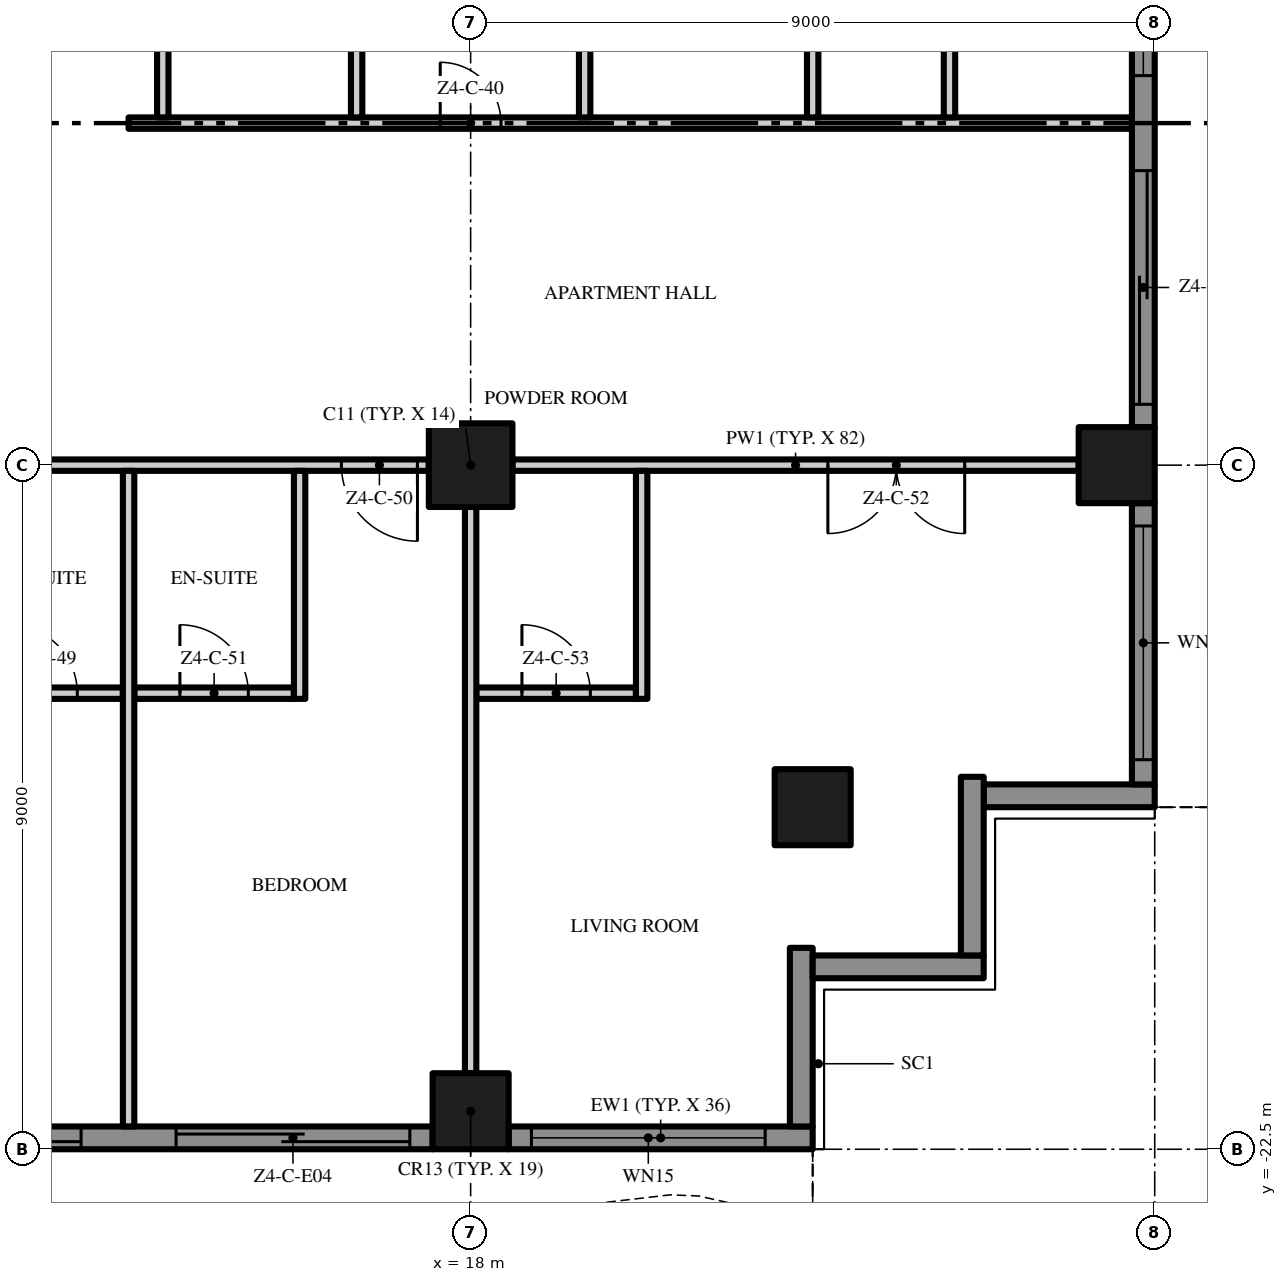
"""IFC4 building model, lengths in metres.
Left out: names, types, materials, properties, quantities, classifications, styles, units other than length and angle.
Written with IfcOpenShell. Run it as: python <this file> out.ifc"""

import sys

from ifc_helpers import new_model, si_unit, direction, frame, frame_2d, origin, origin_2d, place, context, subcontext, project, spatial, polyline, rectangle, outline, extrude, element, fill, save


model = new_model("IFC4")
c1 = context("Model", 3, precision=1e-05, world=origin(), true_north=direction((0.0, 1.0)))
c2 = subcontext(c1, "Body", "Model", "MODEL_VIEW")
j1 = project(units=[si_unit("LENGTHUNIT", "METRE"), si_unit("PLANEANGLEUNIT", "RADIAN")], contexts=[c1])
p1 = place(None, origin())
s1 = spatial("IfcSite", under=j1, at=p1, CompositionType="ELEMENT")
p2 = place(p1, origin())
s2 = spatial("IfcBuilding", under=s1, at=p2, CompositionType="ELEMENT")
p3 = place(p2, frame((0.0, 0.0, 207.2)))
s3 = spatial("IfcBuildingStorey", under=s2, at=p3, CompositionType="ELEMENT", Elevation=207.2)
p4 = place(p3, frame((18.0, -13.5, 0.0), z_axis=(0.0, 0.0, 1.0), x_axis=(1.0, 0.0, 0.0)))
e1 = element("IfcColumn", 1, at=p4, inside=s3, PredefinedType="COLUMN", context=c2, shape_type="SweptSolid", body=[
    extrude(rectangle(XDim=1.1, YDim=1.1, at=origin_2d()), origin(), (0.0, 0.0, 1.0), 3.5),
])
for number, where, z_axis, x_axis in (
    (2, (18.0, -22.0, 0.0), (0.0, 0.0, 1.0), (1.0, 0.0, 0.0)),
    (3, (26.5, -13.5, 0.0), (0.0, 0.0, 1.0), (1.0, 0.0, 0.0)),
    (4, (22.5, -18.0, 0.0), (0.0, 0.0, 1.0), (1.0, 0.0, 0.0)),
):
    element("IfcColumn", number, at=place(p3, frame(where, z_axis=z_axis, x_axis=x_axis)), inside=s3, PredefinedType="COLUMN", context=c2, shape_type="SweptSolid", body=[
        extrude(rectangle(XDim=1.0, YDim=1.0, at=origin_2d()), origin(), (0.0, 0.0, 1.0), 3.5),
    ])
p5 = place(p3, frame((17.5, -22.35, 0.0), z_axis=(0.0, 0.0, 1.0), x_axis=(-1.0, 0.0, 0.0)))
e5 = element("IfcWall", 5, at=p5, inside=s3, PredefinedType="SOLIDWALL", context=c2, shape_type="SweptSolid", body=[
    extrude(rectangle(XDim=8.0, YDim=0.3, at=frame_2d((4.0, 0.0))), origin(), (0.0, 0.0, 1.0), 3.5),
])
p6 = place(p5, frame((4.625, 0.0, 0.0)))
e6 = element("IfcOpeningElement", 6, at=p6, cuts=e5, PredefinedType="OPENING", context=c2, shape_type="SweptSolid", body=[
    extrude(rectangle(XDim=3.075, YDim=2.4, at=frame_2d((1.538, 1.2))), frame((0.0, 0.16, 0.0), z_axis=(0.0, -1.0, 0.0), x_axis=(1.0, 0.0, 0.0)), (0.0, 0.0, 1.0), 0.32),
])
p7 = place(p5, frame((0.3, 0.0, 0.0)))
e7 = element("IfcOpeningElement", 7, at=p7, cuts=e5, PredefinedType="OPENING", context=c2, shape_type="SweptSolid", body=[
    extrude(rectangle(XDim=3.075, YDim=2.4, at=frame_2d((1.538, 1.2))), frame((0.0, 0.16, 0.0), z_axis=(0.0, -1.0, 0.0), x_axis=(1.0, 0.0, 0.0)), (0.0, 0.0, 1.0), 0.32),
])
p8 = place(p3, frame((22.5, -22.35, 0.0), z_axis=(0.0, 0.0, 1.0), x_axis=(-1.0, 0.0, 0.0)))
e8 = element("IfcWall", 8, at=p8, inside=s3, PredefinedType="SOLIDWALL", context=c2, shape_type="SweptSolid", body=[
    extrude(rectangle(XDim=4.0, YDim=0.3, at=frame_2d((2.0, 0.0))), origin(), (0.0, 0.0, 1.0), 3.5),
])
p9 = place(p8, frame((0.625, 0.0, 0.45)))
e9 = element("IfcOpeningElement", 9, at=p9, cuts=e8, PredefinedType="OPENING", context=c2, shape_type="SweptSolid", body=[
    extrude(rectangle(XDim=3.075, YDim=2.65, at=frame_2d((1.538, 1.325))), frame((0.0, 0.16, 0.0), z_axis=(0.0, -1.0, 0.0), x_axis=(1.0, 0.0, 0.0)), (0.0, 0.0, 1.0), 0.32),
])
p10 = place(p3, frame((22.35, -19.85, 0.0), z_axis=(0.0, 0.0, 1.0), x_axis=(0.0, -1.0, 0.0)))
e10 = element("IfcWall", 10, at=p10, inside=s3, PredefinedType="SOLIDWALL", context=c2, shape_type="SweptSolid", body=[
    extrude(rectangle(XDim=2.35, YDim=0.3, at=frame_2d((1.175, 0.0))), origin(), (0.0, 0.0, 1.0), 3.5),
])
p11 = place(p3, frame((24.75, -20.1, 0.0), z_axis=(0.0, 0.0, 1.0), x_axis=(-1.0, 0.0, 0.0)))
e11 = element("IfcWall", 11, at=p11, inside=s3, PredefinedType="SOLIDWALL", context=c2, shape_type="SweptSolid", body=[
    extrude(rectangle(XDim=2.25, YDim=0.3, at=frame_2d((1.125, 0.0))), origin(), (0.0, 0.0, 1.0), 3.5),
])
p12 = place(p3, frame((24.6, -17.6, 0.0), z_axis=(0.0, 0.0, 1.0), x_axis=(0.0, -1.0, 0.0)))
e12 = element("IfcWall", 12, at=p12, inside=s3, PredefinedType="SOLIDWALL", context=c2, shape_type="SweptSolid", body=[
    extrude(rectangle(XDim=2.35, YDim=0.3, at=frame_2d((1.175, 0.0))), origin(), (0.0, 0.0, 1.0), 3.5),
])
p13 = place(p3, frame((27.0, -17.85, 0.0), z_axis=(0.0, 0.0, 1.0), x_axis=(-1.0, 0.0, 0.0)))
e13 = element("IfcWall", 13, at=p13, inside=s3, PredefinedType="SOLIDWALL", context=c2, shape_type="SweptSolid", body=[
    extrude(rectangle(XDim=2.25, YDim=0.3, at=frame_2d((1.125, 0.0))), origin(), (0.0, 0.0, 1.0), 3.5),
])
p14 = place(p3, frame((26.85, -14.0, 0.0), z_axis=(0.0, 0.0, 1.0), x_axis=(0.0, -1.0, 0.0)))
e14 = element("IfcWall", 14, at=p14, inside=s3, PredefinedType="SOLIDWALL", context=c2, shape_type="SweptSolid", body=[
    extrude(rectangle(XDim=3.7, YDim=0.3, at=frame_2d((1.85, 0.0))), origin(), (0.0, 0.0, 1.0), 3.5),
])
p15 = place(p14, frame((0.3, 0.0, 0.45)))
e15 = element("IfcOpeningElement", 15, at=p15, cuts=e14, PredefinedType="OPENING", context=c2, shape_type="SweptSolid", body=[
    extrude(rectangle(XDim=3.075, YDim=2.65, at=frame_2d((1.538, 1.325))), frame((0.0, 0.16, 0.0), z_axis=(0.0, -1.0, 0.0), x_axis=(1.0, 0.0, 0.0)), (0.0, 0.0, 1.0), 0.32),
])
p16 = place(p3, frame((26.85, -5.0, 0.0), z_axis=(0.0, 0.0, 1.0), x_axis=(0.0, -1.0, 0.0)))
e16 = element("IfcWall", 16, at=p16, inside=s3, PredefinedType="SOLIDWALL", context=c2, shape_type="SweptSolid", body=[
    extrude(rectangle(XDim=8.0, YDim=0.3, at=frame_2d((4.0, 0.0))), origin(), (0.0, 0.0, 1.0), 3.5),
])
p17 = place(p16, frame((4.625, 0.0, 0.0)))
e17 = element("IfcOpeningElement", 17, at=p17, cuts=e16, PredefinedType="OPENING", context=c2, shape_type="SweptSolid", body=[
    extrude(rectangle(XDim=3.075, YDim=2.4, at=frame_2d((1.538, 1.2))), frame((0.0, 0.16, 0.0), z_axis=(0.0, -1.0, 0.0), x_axis=(1.0, 0.0, 0.0)), (0.0, 0.0, 1.0), 0.32),
])
p18 = place(p16, frame((0.3, 0.0, 0.45)))
e18 = element("IfcOpeningElement", 18, at=p18, cuts=e16, PredefinedType="OPENING", context=c2, shape_type="SweptSolid", body=[
    extrude(rectangle(XDim=3.075, YDim=2.65, at=frame_2d((1.538, 1.325))), frame((0.0, 0.16, 0.0), z_axis=(0.0, -1.0, 0.0), x_axis=(1.0, 0.0, 0.0)), (0.0, 0.0, 1.0), 0.32),
])
p19 = place(p3, origin())
e19 = element("IfcWall", 19, at=p19, inside=s3, PredefinedType="USERDEFINED", context=c2, shape_type="SweptSolid", body=[
    extrude(outline(polyline([(-22.5, -23.451), (-21.0, -24.112), (-19.5, -24.845), (-18.0, -25.369), (-16.875, -25.5), (-16.5, -25.485), (-15.0, -25.149), (-13.5, -24.488), (-12.0, -23.755), (-10.5, -23.231), (-9.375, -23.1), (-9.0, -23.115), (-7.5, -23.451), (-6.0, -24.112), (-4.5, -24.845), (-3.0, -25.369), (-1.875, -25.5), (-1.5, -25.485), (0.0, -25.149), (1.5, -24.488), (3.0, -23.755), (4.5, -23.231), (5.625, -23.1), (6.0, -23.115), (7.5, -23.451), (9.0, -24.112), (10.5, -24.845), (12.0, -25.369), (13.125, -25.5), (13.5, -25.485), (15.0, -25.149), (16.5, -24.488), (18.0, -23.755), (19.5, -23.231), (20.625, -23.1), (21.0, -23.115), (22.5, -23.451), (22.555, -23.208), (21.033, -22.866), (20.615, -22.849), (19.444, -22.986), (17.904, -23.524), (16.395, -24.261), (14.921, -24.91), (13.467, -25.236), (13.135, -25.249), (12.056, -25.124), (10.596, -24.614), (9.105, -23.885), (7.579, -23.213), (6.033, -22.866), (5.615, -22.849), (4.444, -22.986), (2.904, -23.524), (1.395, -24.261), (-0.079, -24.91), (-1.533, -25.236), (-1.865, -25.249), (-2.944, -25.124), (-4.404, -24.614), (-5.895, -23.885), (-7.421, -23.213), (-8.967, -22.866), (-9.385, -22.849), (-10.556, -22.986), (-12.096, -23.524), (-13.605, -24.261), (-15.079, -24.91), (-16.533, -25.236), (-16.865, -25.249), (-17.944, -25.124), (-19.404, -24.614), (-20.895, -23.885), (-22.399, -23.223), (-22.5, -23.451)])), origin(), (0.0, 0.0, 1.0), 0.9),
])
p20 = place(p3, origin())
e20 = element("IfcWall", 20, at=p20, inside=s3, PredefinedType="USERDEFINED", context=c2, shape_type="SweptSolid", body=[
    extrude(outline(polyline([(27.951, -18.0), (28.612, -16.5), (29.345, -15.0), (29.869, -13.5), (30.0, -12.375), (29.985, -12.0), (29.649, -10.5), (28.988, -9.0), (28.255, -7.5), (27.731, -6.0), (27.6, -4.875), (27.615, -4.5), (27.951, -3.0), (28.612, -1.5), (29.345, 0.0), (29.869, 1.5), (30.0, 2.625), (29.985, 3.0), (29.649, 4.5), (28.988, 6.0), (28.255, 7.5), (27.731, 9.0), (27.6, 10.125), (27.615, 10.5), (27.951, 12.0), (28.612, 13.5), (29.345, 15.0), (29.869, 16.5), (30.0, 17.625), (29.985, 18.0), (29.735, 17.99), (29.749, 17.635), (29.624, 16.556), (29.114, 15.096), (28.385, 13.605), (27.713, 12.079), (27.366, 10.533), (27.349, 10.115), (27.486, 8.944), (28.024, 7.404), (28.761, 5.895), (29.41, 4.421), (29.736, 2.967), (29.749, 2.635), (29.624, 1.556), (29.114, 0.096), (28.385, -1.395), (27.713, -2.921), (27.366, -4.467), (27.349, -4.885), (27.486, -6.056), (28.024, -7.596), (28.761, -9.105), (29.41, -10.579), (29.736, -12.033), (29.749, -12.365), (29.624, -13.444), (29.114, -14.904), (28.385, -16.395), (27.723, -17.899), (27.951, -18.0)])), origin(), (0.0, 0.0, 1.0), 0.9),
])
p21 = place(p3, frame((11.325, -16.5, 0.0), z_axis=(0.0, 0.0, 1.0), x_axis=(1.0, 0.0, 0.0)))
e21 = element("IfcWall", 21, at=p21, inside=s3, PredefinedType="PARTITIONING", context=c2, shape_type="SweptSolid", body=[
    extrude(rectangle(XDim=2.1, YDim=0.15, at=frame_2d((1.05, 0.0))), origin(), (0.0, 0.0, 1.0), 3.5),
])
p22 = place(p21, frame((0.6, 0.0, 0.0)))
e22 = element("IfcOpeningElement", 22, at=p22, cuts=e21, PredefinedType="OPENING", context=c2, shape_type="SweptSolid", body=[
    extrude(rectangle(XDim=0.9, YDim=2.1, at=frame_2d((0.45, 1.05))), frame((0.0, 0.085, 0.0), z_axis=(0.0, -1.0, 0.0), x_axis=(1.0, 0.0, 0.0)), (0.0, 0.0, 1.0), 0.17),
])
p23 = place(p3, frame((13.575, -16.5, 0.0), z_axis=(0.0, 0.0, 1.0), x_axis=(1.0, 0.0, 0.0)))
e23 = element("IfcWall", 23, at=p23, inside=s3, PredefinedType="PARTITIONING", context=c2, shape_type="SweptSolid", body=[
    extrude(rectangle(XDim=2.1, YDim=0.15, at=frame_2d((1.05, 0.0))), origin(), (0.0, 0.0, 1.0), 3.5),
])
p24 = place(p23, frame((0.6, 0.0, 0.0)))
e24 = element("IfcOpeningElement", 24, at=p24, cuts=e23, PredefinedType="OPENING", context=c2, shape_type="SweptSolid", body=[
    extrude(rectangle(XDim=0.9, YDim=2.1, at=frame_2d((0.45, 1.05))), frame((0.0, 0.085, 0.0), z_axis=(0.0, -1.0, 0.0), x_axis=(1.0, 0.0, 0.0)), (0.0, 0.0, 1.0), 0.17),
])
p25 = place(p3, frame((18.075, -16.5, 0.0), z_axis=(0.0, 0.0, 1.0), x_axis=(1.0, 0.0, 0.0)))
e25 = element("IfcWall", 25, at=p25, inside=s3, PredefinedType="PARTITIONING", context=c2, shape_type="SweptSolid", body=[
    extrude(rectangle(XDim=2.1, YDim=0.15, at=frame_2d((1.05, 0.0))), origin(), (0.0, 0.0, 1.0), 3.5),
])
p26 = place(p25, frame((0.6, 0.0, 0.0)))
e26 = element("IfcOpeningElement", 26, at=p26, cuts=e25, PredefinedType="OPENING", context=c2, shape_type="SweptSolid", body=[
    extrude(rectangle(XDim=0.9, YDim=2.1, at=frame_2d((0.45, 1.05))), frame((0.0, 0.085, 0.0), z_axis=(0.0, -1.0, 0.0), x_axis=(1.0, 0.0, 0.0)), (0.0, 0.0, 1.0), 0.17),
])
p27 = place(p3, frame((17.45, -13.5, 0.0), z_axis=(0.0, 0.0, 1.0), x_axis=(-1.0, 0.0, 0.0)))
e27 = element("IfcWall", 27, at=p27, inside=s3, PredefinedType="PARTITIONING", context=c2, shape_type="SweptSolid", body=[
    extrude(rectangle(XDim=7.9, YDim=0.15, at=frame_2d((3.95, 0.0))), origin(), (0.0, 0.0, 1.0), 3.5),
])
p28 = place(p27, frame((6.75, 0.0, 0.0)))
e28 = element("IfcOpeningElement", 28, at=p28, cuts=e27, PredefinedType="OPENING", context=c2, shape_type="SweptSolid", body=[
    extrude(rectangle(XDim=1.0, YDim=2.4, at=frame_2d((0.5, 1.2))), frame((0.0, 0.085, 0.0), z_axis=(0.0, -1.0, 0.0), x_axis=(1.0, 0.0, 0.0)), (0.0, 0.0, 1.0), 0.17),
])
p29 = place(p27, frame((0.15, 0.0, 0.0)))
e29 = element("IfcOpeningElement", 29, at=p29, cuts=e27, PredefinedType="OPENING", context=c2, shape_type="SweptSolid", body=[
    extrude(rectangle(XDim=1.0, YDim=2.4, at=frame_2d((0.5, 1.2))), frame((0.0, 0.085, 0.0), z_axis=(0.0, -1.0, 0.0), x_axis=(1.0, 0.0, 0.0)), (0.0, 0.0, 1.0), 0.17),
])
p30 = place(p3, frame((26.0, -13.5, 0.0), z_axis=(0.0, 0.0, 1.0), x_axis=(-1.0, 0.0, 0.0)))
e30 = element("IfcWall", 30, at=p30, inside=s3, PredefinedType="PARTITIONING", context=c2, shape_type="SweptSolid", body=[
    extrude(rectangle(XDim=7.45, YDim=0.15, at=frame_2d((3.725, 0.0))), origin(), (0.0, 0.0, 1.0), 3.5),
])
p31 = place(p30, frame((1.5, 0.0, 0.0)))
e31 = element("IfcOpeningElement", 31, at=p31, cuts=e30, PredefinedType="OPENING", context=c2, shape_type="SweptSolid", body=[
    extrude(rectangle(XDim=1.8, YDim=2.4, at=frame_2d((0.9, 1.2))), frame((0.0, 0.085, 0.0), z_axis=(0.0, -1.0, 0.0), x_axis=(1.0, 0.0, 0.0)), (0.0, 0.0, 1.0), 0.17),
])
p32 = place(p3, frame((13.5, -9.0, 0.0), z_axis=(0.0, 0.0, 1.0), x_axis=(1.0, 0.0, 0.0)))
e32 = element("IfcWall", 32, at=p32, inside=s3, PredefinedType="PARTITIONING", context=c2, shape_type="SweptSolid", body=[
    extrude(rectangle(XDim=13.2, YDim=0.15, at=frame_2d((6.6, 0.0))), origin(), (0.0, 0.0, 1.0), 3.5),
])
p33 = place(p32, frame((4.1, 0.0, 0.0)))
e33 = element("IfcOpeningElement", 33, at=p33, cuts=e32, PredefinedType="OPENING", context=c2, shape_type="SweptSolid", body=[
    extrude(rectangle(XDim=0.8, YDim=2.0, at=frame_2d((0.4, 1.0))), frame((0.0, 0.085, 0.0), z_axis=(0.0, -1.0, 0.0), x_axis=(1.0, 0.0, 0.0)), (0.0, 0.0, 1.0), 0.17),
])
p34 = place(p3, frame((13.5, -22.2, 0.0), z_axis=(0.0, 0.0, 1.0), x_axis=(0.0, 1.0, 0.0)))
e34 = element("IfcWall", 34, at=p34, inside=s3, PredefinedType="PARTITIONING", context=c2, shape_type="SweptSolid", body=[
    extrude(rectangle(XDim=8.625, YDim=0.15, at=frame_2d((4.312, 0.0))), origin(), (0.0, 0.0, 1.0), 3.5),
])
p35 = place(p3, frame((13.95, -8.925, 0.0), z_axis=(0.0, 0.0, 1.0), x_axis=(0.0, 1.0, 0.0)))
e35 = element("IfcWall", 35, at=p35, inside=s3, PredefinedType="PARTITIONING", context=c2, shape_type="SweptSolid", body=[
    extrude(rectangle(XDim=4.5, YDim=0.15, at=frame_2d((2.25, 0.0))), origin(), (0.0, 0.0, 1.0), 3.5),
])
p36 = place(p3, frame((15.75, -16.575, 0.0), z_axis=(0.0, 0.0, 1.0), x_axis=(0.0, 1.0, 0.0)))
e36 = element("IfcWall", 36, at=p36, inside=s3, PredefinedType="PARTITIONING", context=c2, shape_type="SweptSolid", body=[
    extrude(rectangle(XDim=3.0, YDim=0.15, at=frame_2d((1.5, 0.0))), origin(), (0.0, 0.0, 1.0), 3.5),
])
p37 = place(p3, frame((16.5, -8.925, 0.0), z_axis=(0.0, 0.0, 1.0), x_axis=(0.0, 1.0, 0.0)))
e37 = element("IfcWall", 37, at=p37, inside=s3, PredefinedType="PARTITIONING", context=c2, shape_type="SweptSolid", body=[
    extrude(rectangle(XDim=4.35, YDim=0.15, at=frame_2d((2.175, 0.0))), origin(), (0.0, 0.0, 1.0), 3.5),
])
p38 = place(p3, frame((18.0, -21.5, 0.0), z_axis=(0.0, 0.0, 1.0), x_axis=(0.0, 1.0, 0.0)))
e38 = element("IfcWall", 38, at=p38, inside=s3, PredefinedType="PARTITIONING", context=c2, shape_type="SweptSolid", body=[
    extrude(rectangle(XDim=7.45, YDim=0.15, at=frame_2d((3.725, 0.0))), origin(), (0.0, 0.0, 1.0), 3.5),
])
p39 = place(p3, frame((19.5, -8.925, 0.0), z_axis=(0.0, 0.0, 1.0), x_axis=(0.0, 1.0, 0.0)))
e39 = element("IfcWall", 39, at=p39, inside=s3, PredefinedType="PARTITIONING", context=c2, shape_type="SweptSolid", body=[
    extrude(rectangle(XDim=4.35, YDim=0.15, at=frame_2d((2.175, 0.0))), origin(), (0.0, 0.0, 1.0), 3.5),
])
p40 = place(p3, frame((20.25, -16.575, 0.0), z_axis=(0.0, 0.0, 1.0), x_axis=(0.0, 1.0, 0.0)))
e40 = element("IfcWall", 40, at=p40, inside=s3, PredefinedType="PARTITIONING", context=c2, shape_type="SweptSolid", body=[
    extrude(rectangle(XDim=3.0, YDim=0.15, at=frame_2d((1.5, 0.0))), origin(), (0.0, 0.0, 1.0), 3.5),
])
for number, where, z_axis, x_axis in (
    (41, (22.5, -8.925, 0.0), (0.0, 0.0, 1.0), (0.0, 1.0, 0.0)),
    (42, (24.3, -8.925, 0.0), (0.0, 0.0, 1.0), (0.0, 1.0, 0.0)),
):
    element("IfcWall", number, at=place(p3, frame(where, z_axis=z_axis, x_axis=x_axis)), inside=s3, PredefinedType="PARTITIONING", context=c2, shape_type="SweptSolid", body=[
        extrude(rectangle(XDim=4.35, YDim=0.15, at=frame_2d((2.175, 0.0))), origin(), (0.0, 0.0, 1.0), 3.5),
    ])
p41 = place(p6, origin())
e43 = element("IfcDoor", 43, at=p41, inside=s3, OperationType="SINGLE_SWING_LEFT", PredefinedType="DOOR", context=c2, shape_type="SweptSolid", body=[
    extrude(rectangle(XDim=3.075, YDim=2.4, at=frame_2d((1.538, 1.2))), frame((0.0, 0.025, 0.0), z_axis=(0.0, -1.0, 0.0), x_axis=(1.0, 0.0, 0.0)), (0.0, 0.0, 1.0), 0.05),
])
fill(e6, e43)
p42 = place(p7, origin())
e44 = element("IfcDoor", 44, at=p42, inside=s3, OperationType="SINGLE_SWING_LEFT", PredefinedType="DOOR", context=c2, shape_type="SweptSolid", body=[
    extrude(rectangle(XDim=3.075, YDim=2.4, at=frame_2d((1.538, 1.2))), frame((0.0, 0.025, 0.0), z_axis=(0.0, -1.0, 0.0), x_axis=(1.0, 0.0, 0.0)), (0.0, 0.0, 1.0), 0.05),
])
fill(e7, e44)
p43 = place(p9, origin())
e45 = element("IfcWindow", 45, at=p43, inside=s3, PartitioningType="SINGLE_PANEL", PredefinedType="WINDOW", context=c2, shape_type="SweptSolid", body=[
    extrude(rectangle(XDim=3.075, YDim=2.65, at=frame_2d((1.538, 1.325))), frame((0.0, 0.03, 0.0), z_axis=(0.0, -1.0, 0.0), x_axis=(1.0, 0.0, 0.0)), (0.0, 0.0, 1.0), 0.06),
])
fill(e9, e45)
p44 = place(p15, origin())
e46 = element("IfcWindow", 46, at=p44, inside=s3, PartitioningType="SINGLE_PANEL", PredefinedType="WINDOW", context=c2, shape_type="SweptSolid", body=[
    extrude(rectangle(XDim=3.075, YDim=2.65, at=frame_2d((1.538, 1.325))), frame((0.0, 0.03, 0.0), z_axis=(0.0, -1.0, 0.0), x_axis=(1.0, 0.0, 0.0)), (0.0, 0.0, 1.0), 0.06),
])
fill(e15, e46)
p45 = place(p17, origin())
e47 = element("IfcDoor", 47, at=p45, inside=s3, OperationType="SINGLE_SWING_LEFT", PredefinedType="DOOR", context=c2, shape_type="SweptSolid", body=[
    extrude(rectangle(XDim=3.075, YDim=2.4, at=frame_2d((1.538, 1.2))), frame((0.0, 0.025, 0.0), z_axis=(0.0, -1.0, 0.0), x_axis=(1.0, 0.0, 0.0)), (0.0, 0.0, 1.0), 0.05),
])
fill(e17, e47)
p46 = place(p18, origin())
e48 = element("IfcWindow", 48, at=p46, inside=s3, PartitioningType="SINGLE_PANEL", PredefinedType="WINDOW", context=c2, shape_type="SweptSolid", body=[
    extrude(rectangle(XDim=3.075, YDim=2.65, at=frame_2d((1.538, 1.325))), frame((0.0, 0.03, 0.0), z_axis=(0.0, -1.0, 0.0), x_axis=(1.0, 0.0, 0.0)), (0.0, 0.0, 1.0), 0.06),
])
fill(e18, e48)
p47 = place(p33, origin())
e49 = element("IfcDoor", 49, at=p47, inside=s3, OperationType="SINGLE_SWING_LEFT", PredefinedType="DOOR", context=c2, shape_type="SweptSolid", body=[
    extrude(rectangle(XDim=0.8, YDim=2.0, at=frame_2d((0.4, 1.0))), frame((0.0, 0.025, 0.0), z_axis=(0.0, -1.0, 0.0), x_axis=(1.0, 0.0, 0.0)), (0.0, 0.0, 1.0), 0.05),
])
fill(e33, e49)
p48 = place(p22, origin())
e50 = element("IfcDoor", 50, at=p48, inside=s3, OperationType="SINGLE_SWING_LEFT", PredefinedType="DOOR", context=c2, shape_type="SweptSolid", body=[
    extrude(rectangle(XDim=0.9, YDim=2.1, at=frame_2d((0.45, 1.05))), frame((0.0, 0.025, 0.0), z_axis=(0.0, -1.0, 0.0), x_axis=(1.0, 0.0, 0.0)), (0.0, 0.0, 1.0), 0.05),
])
fill(e22, e50)
p49 = place(p29, origin())
e51 = element("IfcDoor", 51, at=p49, inside=s3, OperationType="SINGLE_SWING_LEFT", PredefinedType="DOOR", context=c2, shape_type="SweptSolid", body=[
    extrude(rectangle(XDim=1.0, YDim=2.4, at=frame_2d((0.5, 1.2))), frame((0.0, 0.025, 0.0), z_axis=(0.0, -1.0, 0.0), x_axis=(1.0, 0.0, 0.0)), (0.0, 0.0, 1.0), 0.05),
])
fill(e29, e51)
p50 = place(p24, origin())
e52 = element("IfcDoor", 52, at=p50, inside=s3, OperationType="SINGLE_SWING_LEFT", PredefinedType="DOOR", context=c2, shape_type="SweptSolid", body=[
    extrude(rectangle(XDim=0.9, YDim=2.1, at=frame_2d((0.45, 1.05))), frame((0.0, 0.025, 0.0), z_axis=(0.0, -1.0, 0.0), x_axis=(1.0, 0.0, 0.0)), (0.0, 0.0, 1.0), 0.05),
])
fill(e24, e52)
p51 = place(p31, origin())
e53 = element("IfcDoor", 53, at=p51, inside=s3, OperationType="DOUBLE_DOOR_SINGLE_SWING", PredefinedType="DOOR", context=c2, shape_type="SweptSolid", body=[
    extrude(rectangle(XDim=1.8, YDim=2.4, at=frame_2d((0.9, 1.2))), frame((0.0, 0.025, 0.0), z_axis=(0.0, -1.0, 0.0), x_axis=(1.0, 0.0, 0.0)), (0.0, 0.0, 1.0), 0.05),
])
fill(e31, e53)
p52 = place(p26, origin())
e54 = element("IfcDoor", 54, at=p52, inside=s3, OperationType="SINGLE_SWING_LEFT", PredefinedType="DOOR", context=c2, shape_type="SweptSolid", body=[
    extrude(rectangle(XDim=0.9, YDim=2.1, at=frame_2d((0.45, 1.05))), frame((0.0, 0.025, 0.0), z_axis=(0.0, -1.0, 0.0), x_axis=(1.0, 0.0, 0.0)), (0.0, 0.0, 1.0), 0.05),
])
fill(e26, e54)
save(model, sys.argv[1])
